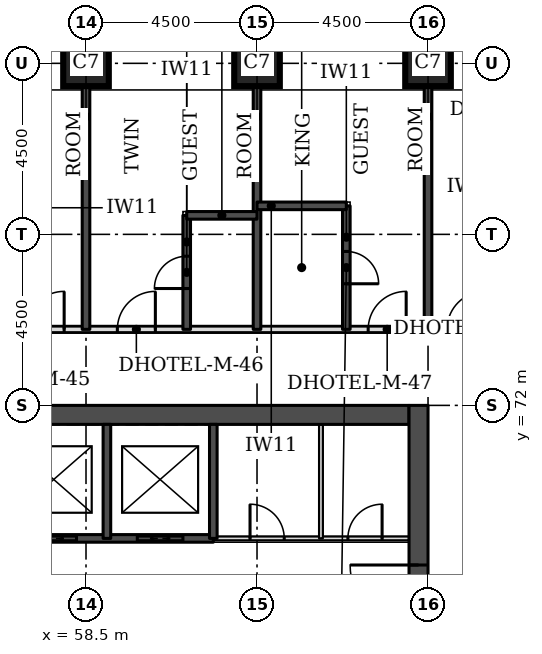
"""IFC4 building model, lengths in metres.
Left out: names, types, materials, properties, quantities, classifications, styles, units other than length and angle.
Written with IfcOpenShell. Run it as: python <this file> out.ifc"""

import sys

from ifc_helpers import new_model, si_unit, direction, frame, frame_2d, origin, origin_2d, place, context, subcontext, project, spatial, rectangle, extrude, element, fill, save


model = new_model("IFC4")
c1 = context("Model", 3, precision=1e-05, world=origin(), true_north=direction((0.0, 1.0)))
c2 = subcontext(c1, "Body", "Model", "MODEL_VIEW")
j1 = project(units=[si_unit("LENGTHUNIT", "METRE"), si_unit("PLANEANGLEUNIT", "RADIAN")], contexts=[c1])
p1 = place(None, origin())
s1 = spatial("IfcSite", under=j1, at=p1, CompositionType="ELEMENT")
p2 = place(p1, origin())
s2 = spatial("IfcBuilding", under=s1, at=p2, CompositionType="ELEMENT")
p3 = place(p2, frame((0.0, 0.0, 23.1)))
s3 = spatial("IfcBuildingStorey", under=s2, at=p3, CompositionType="ELEMENT", Elevation=23.1)
for number, where, z_axis, x_axis in (
    (1, (58.5, 81.0, 0.0), (0.0, 0.0, 1.0), (1.0, 0.0, 0.0)),
    (2, (63.0, 81.0, 0.0), (0.0, 0.0, 1.0), (1.0, 0.0, 0.0)),
    (3, (67.5, 81.0, 0.0), (0.0, 0.0, 1.0), (1.0, 0.0, 0.0)),
):
    element("IfcColumn", number, at=place(p3, frame(where, z_axis=z_axis, x_axis=x_axis)), inside=s3, PredefinedType="COLUMN", context=c2, shape_type="SweptSolid", body=[
        extrude(rectangle(XDim=1.2, YDim=1.2, at=origin_2d()), origin(), (0.0, 0.0, 1.0), 3.3),
    ])
p4 = place(p3, frame((45.5, 71.75, 0.0), z_axis=(0.0, 0.0, 1.0), x_axis=(1.0, 0.0, 0.0)))
e4 = element("IfcWall", 4, at=p4, inside=s3, PredefinedType="SHEAR", context=c2, shape_type="SweptSolid", body=[
    extrude(rectangle(XDim=21.5, YDim=0.5, at=frame_2d((10.75, 0.0))), origin(), (0.0, 0.0, 1.0), 3.3),
])
p5 = place(p3, frame((67.25, 49.5, 0.0), z_axis=(0.0, 0.0, 1.0), x_axis=(0.0, 1.0, 0.0)))
e5 = element("IfcWall", 5, at=p5, inside=s3, PredefinedType="SHEAR", context=c2, shape_type="SweptSolid", body=[
    extrude(rectangle(XDim=22.5, YDim=0.5, at=frame_2d((11.25, 0.0))), origin(), (0.0, 0.0, 1.0), 3.3),
])
p6 = place(p5, frame((4.2, 0.0, 0.0)))
e6 = element("IfcOpeningElement", 6, at=p6, cuts=e5, PredefinedType="OPENING", context=c2, shape_type="SweptSolid", body=[
    extrude(rectangle(XDim=1.8, YDim=2.1, at=frame_2d((0.9, 1.05))), frame((0.0, 0.26, 0.0), z_axis=(0.0, -1.0, 0.0), x_axis=(1.0, 0.0, 0.0)), (0.0, 0.0, 1.0), 0.52),
])
p7 = place(p5, frame((6.9, 0.0, 0.0)))
e7 = element("IfcOpeningElement", 7, at=p7, cuts=e5, PredefinedType="OPENING", context=c2, shape_type="SweptSolid", body=[
    extrude(rectangle(XDim=1.1, YDim=2.1, at=frame_2d((0.55, 1.05))), frame((0.0, 0.26, 0.0), z_axis=(0.0, -1.0, 0.0), x_axis=(1.0, 0.0, 0.0)), (0.0, 0.0, 1.0), 0.52),
])
p8 = place(p5, frame((13.6, 0.0, 0.0)))
e8 = element("IfcOpeningElement", 8, at=p8, cuts=e5, PredefinedType="OPENING", context=c2, shape_type="SweptSolid", body=[
    extrude(rectangle(XDim=1.1, YDim=2.1, at=frame_2d((0.55, 1.05))), frame((0.0, 0.26, 0.0), z_axis=(0.0, -1.0, 0.0), x_axis=(1.0, 0.0, 0.0)), (0.0, 0.0, 1.0), 0.52),
])
p9 = place(p5, frame((16.5, 0.0, 0.0)))
e9 = element("IfcOpeningElement", 9, at=p9, cuts=e5, PredefinedType="OPENING", context=c2, shape_type="SweptSolid", body=[
    extrude(rectangle(XDim=1.8, YDim=2.1, at=frame_2d((0.9, 1.05))), frame((0.0, 0.26, 0.0), z_axis=(0.0, -1.0, 0.0), x_axis=(1.0, 0.0, 0.0)), (0.0, 0.0, 1.0), 0.52),
])
p10 = place(p3, frame((43.0, 74.0, 0.0), z_axis=(0.0, 0.0, 1.0), x_axis=(1.0, 0.0, 0.0)))
e10 = element("IfcWall", 10, at=p10, inside=s3, PredefinedType="PARTITIONING", context=c2, shape_type="SweptSolid", body=[
    extrude(rectangle(XDim=26.5, YDim=0.15, at=frame_2d((13.25, 0.0))), origin(), (0.0, 0.0, 1.0), 3.08),
])
p11 = place(p10, frame((4.925, 0.0, 0.0)))
e11 = element("IfcOpeningElement", 11, at=p11, cuts=e10, PredefinedType="OPENING", context=c2, shape_type="SweptSolid", body=[
    extrude(rectangle(XDim=1.0, YDim=2.1, at=frame_2d((0.5, 1.05))), frame((0.0, 0.085, 0.0), z_axis=(0.0, -1.0, 0.0), x_axis=(1.0, 0.0, 0.0)), (0.0, 0.0, 1.0), 0.17),
])
p12 = place(p10, frame((7.325, 0.0, 0.0)))
e12 = element("IfcOpeningElement", 12, at=p12, cuts=e10, PredefinedType="OPENING", context=c2, shape_type="SweptSolid", body=[
    extrude(rectangle(XDim=1.0, YDim=2.1, at=frame_2d((0.5, 1.05))), frame((0.0, 0.085, 0.0), z_axis=(0.0, -1.0, 0.0), x_axis=(1.0, 0.0, 0.0)), (0.0, 0.0, 1.0), 0.17),
])
p13 = place(p10, frame((13.925, 0.0, 0.0)))
e13 = element("IfcOpeningElement", 13, at=p13, cuts=e10, PredefinedType="OPENING", context=c2, shape_type="SweptSolid", body=[
    extrude(rectangle(XDim=1.0, YDim=2.1, at=frame_2d((0.5, 1.05))), frame((0.0, 0.085, 0.0), z_axis=(0.0, -1.0, 0.0), x_axis=(1.0, 0.0, 0.0)), (0.0, 0.0, 1.0), 0.17),
])
p14 = place(p10, frame((16.325, 0.0, 0.0)))
e14 = element("IfcOpeningElement", 14, at=p14, cuts=e10, PredefinedType="OPENING", context=c2, shape_type="SweptSolid", body=[
    extrude(rectangle(XDim=1.0, YDim=2.1, at=frame_2d((0.5, 1.05))), frame((0.0, 0.085, 0.0), z_axis=(0.0, -1.0, 0.0), x_axis=(1.0, 0.0, 0.0)), (0.0, 0.0, 1.0), 0.17),
])
p15 = place(p10, frame((22.925, 0.0, 0.0)))
e15 = element("IfcOpeningElement", 15, at=p15, cuts=e10, PredefinedType="OPENING", context=c2, shape_type="SweptSolid", body=[
    extrude(rectangle(XDim=1.0, YDim=2.1, at=frame_2d((0.5, 1.05))), frame((0.0, 0.085, 0.0), z_axis=(0.0, -1.0, 0.0), x_axis=(1.0, 0.0, 0.0)), (0.0, 0.0, 1.0), 0.17),
])
p16 = place(p10, frame((0.5, 0.0, 0.0)))
e16 = element("IfcOpeningElement", 16, at=p16, cuts=e10, PredefinedType="OPENING", context=c2, shape_type="SweptSolid", body=[
    extrude(rectangle(XDim=1.0, YDim=2.1, at=frame_2d((0.5, 1.05))), frame((0.0, 0.085, 0.0), z_axis=(0.0, -1.0, 0.0), x_axis=(1.0, 0.0, 0.0)), (0.0, 0.0, 1.0), 0.17),
])
p17 = place(p10, frame((25.0, 0.0, 0.0)))
e17 = element("IfcOpeningElement", 17, at=p17, cuts=e10, PredefinedType="OPENING", context=c2, shape_type="SweptSolid", body=[
    extrude(rectangle(XDim=1.0, YDim=2.1, at=frame_2d((0.5, 1.05))), frame((0.0, 0.085, 0.0), z_axis=(0.0, -1.0, 0.0), x_axis=(1.0, 0.0, 0.0)), (0.0, 0.0, 1.0), 0.17),
])
p18 = place(p3, frame((58.5, 74.0, 0.0), z_axis=(0.0, 0.0, 1.0), x_axis=(0.0, 1.0, 0.0)))
e18 = element("IfcWall", 18, at=p18, inside=s3, PredefinedType="SOLIDWALL", context=c2, shape_type="SweptSolid", body=[
    extrude(rectangle(XDim=6.4, YDim=0.2, at=frame_2d((3.2, 0.0))), origin(), (0.0, 0.0, 1.0), 3.08),
])
p19 = place(p3, frame((61.15, 74.0, 0.0), z_axis=(0.0, 0.0, 1.0), x_axis=(0.0, 1.0, 0.0)))
e19 = element("IfcWall", 19, at=p19, inside=s3, PredefinedType="SOLIDWALL", context=c2, shape_type="SweptSolid", body=[
    extrude(rectangle(XDim=3.0, YDim=0.2, at=frame_2d((1.5, 0.0))), origin(), (0.0, 0.0, 1.0), 3.08),
])
p20 = place(p19, frame((1.075, 0.0, 0.0)))
e20 = element("IfcOpeningElement", 20, at=p20, cuts=e19, PredefinedType="OPENING", context=c2, shape_type="SweptSolid", body=[
    extrude(rectangle(XDim=0.85, YDim=2.1, at=frame_2d((0.425, 1.05))), frame((0.0, 0.11, 0.0), z_axis=(0.0, -1.0, 0.0), x_axis=(1.0, 0.0, 0.0)), (0.0, 0.0, 1.0), 0.22),
])
p21 = place(p3, frame((63.0, 74.0, 0.0), z_axis=(0.0, 0.0, 1.0), x_axis=(0.0, 1.0, 0.0)))
e21 = element("IfcWall", 21, at=p21, inside=s3, PredefinedType="SOLIDWALL", context=c2, shape_type="SweptSolid", body=[
    extrude(rectangle(XDim=6.4, YDim=0.2, at=frame_2d((3.2, 0.0))), origin(), (0.0, 0.0, 1.0), 3.08),
])
p22 = place(p3, frame((65.35, 74.0, 0.0), z_axis=(0.0, 0.0, 1.0), x_axis=(0.0, 1.0, 0.0)))
e22 = element("IfcWall", 22, at=p22, inside=s3, PredefinedType="SOLIDWALL", context=c2, shape_type="SweptSolid", body=[
    extrude(rectangle(XDim=3.25, YDim=0.2, at=frame_2d((1.625, 0.0))), origin(), (0.0, 0.0, 1.0), 3.08),
])
p23 = place(p22, frame((1.2, 0.0, 0.0)))
e23 = element("IfcOpeningElement", 23, at=p23, cuts=e22, PredefinedType="OPENING", context=c2, shape_type="SweptSolid", body=[
    extrude(rectangle(XDim=0.85, YDim=2.1, at=frame_2d((0.425, 1.05))), frame((0.0, 0.11, 0.0), z_axis=(0.0, -1.0, 0.0), x_axis=(1.0, 0.0, 0.0)), (0.0, 0.0, 1.0), 0.22),
])
p24 = place(p3, frame((67.5, 74.0, 0.0), z_axis=(0.0, 0.0, 1.0), x_axis=(0.0, 1.0, 0.0)))
e24 = element("IfcWall", 24, at=p24, inside=s3, PredefinedType="SOLIDWALL", context=c2, shape_type="SweptSolid", body=[
    extrude(rectangle(XDim=6.4, YDim=0.2, at=frame_2d((3.2, 0.0))), origin(), (0.0, 0.0, 1.0), 3.08),
])
p25 = place(p3, frame((61.15, 77.0, 0.0), z_axis=(0.0, 0.0, 1.0), x_axis=(1.0, 0.0, 0.0)))
e25 = element("IfcWall", 25, at=p25, inside=s3, PredefinedType="SOLIDWALL", context=c2, shape_type="SweptSolid", body=[
    extrude(rectangle(XDim=1.85, YDim=0.2, at=frame_2d((0.925, 0.0))), origin(), (0.0, 0.0, 1.0), 3.08),
])
p26 = place(p3, frame((63.0, 77.25, 0.0), z_axis=(0.0, 0.0, 1.0), x_axis=(1.0, 0.0, 0.0)))
e26 = element("IfcWall", 26, at=p26, inside=s3, PredefinedType="SOLIDWALL", context=c2, shape_type="SweptSolid", body=[
    extrude(rectangle(XDim=2.35, YDim=0.2, at=frame_2d((1.175, 0.0))), origin(), (0.0, 0.0, 1.0), 3.08),
])
p27 = place(p3, frame((61.85, 68.5, 0.0), z_axis=(0.0, 0.0, 1.0), x_axis=(1.0, 0.0, 0.0)))
e27 = element("IfcWall", 27, at=p27, inside=s3, PredefinedType="PARTITIONING", context=c2, shape_type="SweptSolid", body=[
    extrude(rectangle(XDim=5.15, YDim=0.1, at=frame_2d((2.575, 0.0))), origin(), (0.0, 0.0, 1.0), 3.08),
])
p28 = place(p27, frame((3.541, 0.0, 0.0)))
e28 = element("IfcOpeningElement", 28, at=p28, cuts=e27, PredefinedType="OPENING", context=c2, shape_type="SweptSolid", body=[
    extrude(rectangle(XDim=0.9, YDim=2.1, at=frame_2d((0.45, 1.05))), frame((0.0, 0.06, 0.0), z_axis=(0.0, -1.0, 0.0), x_axis=(1.0, 0.0, 0.0)), (0.0, 0.0, 1.0), 0.12),
])
p29 = place(p27, frame((0.966, 0.0, 0.0)))
e29 = element("IfcOpeningElement", 29, at=p29, cuts=e27, PredefinedType="OPENING", context=c2, shape_type="SweptSolid", body=[
    extrude(rectangle(XDim=0.9, YDim=2.1, at=frame_2d((0.45, 1.05))), frame((0.0, 0.06, 0.0), z_axis=(0.0, -1.0, 0.0), x_axis=(1.0, 0.0, 0.0)), (0.0, 0.0, 1.0), 0.12),
])
p30 = place(p3, frame((50.65, 68.5, 0.0), z_axis=(0.0, 0.0, 1.0), x_axis=(1.0, 0.0, 0.0)))
e30 = element("IfcWall", 30, at=p30, inside=s3, PredefinedType="SOLIDWALL", context=c2, shape_type="SweptSolid", body=[
    extrude(rectangle(XDim=11.2, YDim=0.2, at=frame_2d((5.6, 0.0))), origin(), (0.0, 0.0, 1.0), 3.08),
])
p31 = place(p30, frame((0.8, 0.0, 0.0)))
e31 = element("IfcOpeningElement", 31, at=p31, cuts=e30, PredefinedType="OPENING", context=c2, shape_type="SweptSolid", body=[
    extrude(rectangle(XDim=1.2, YDim=2.1, at=frame_2d((0.6, 1.05))), frame((0.0, 0.11, 0.0), z_axis=(0.0, -1.0, 0.0), x_axis=(1.0, 0.0, 0.0)), (0.0, 0.0, 1.0), 0.22),
])
p32 = place(p30, frame((3.6, 0.0, 0.0)))
e32 = element("IfcOpeningElement", 32, at=p32, cuts=e30, PredefinedType="OPENING", context=c2, shape_type="SweptSolid", body=[
    extrude(rectangle(XDim=1.2, YDim=2.1, at=frame_2d((0.6, 1.05))), frame((0.0, 0.11, 0.0), z_axis=(0.0, -1.0, 0.0), x_axis=(1.0, 0.0, 0.0)), (0.0, 0.0, 1.0), 0.22),
])
p33 = place(p30, frame((6.4, 0.0, 0.0)))
e33 = element("IfcOpeningElement", 33, at=p33, cuts=e30, PredefinedType="OPENING", context=c2, shape_type="SweptSolid", body=[
    extrude(rectangle(XDim=1.2, YDim=2.1, at=frame_2d((0.6, 1.05))), frame((0.0, 0.11, 0.0), z_axis=(0.0, -1.0, 0.0), x_axis=(1.0, 0.0, 0.0)), (0.0, 0.0, 1.0), 0.22),
])
p34 = place(p30, frame((9.2, 0.0, 0.0)))
e34 = element("IfcOpeningElement", 34, at=p34, cuts=e30, PredefinedType="OPENING", context=c2, shape_type="SweptSolid", body=[
    extrude(rectangle(XDim=1.2, YDim=2.1, at=frame_2d((0.6, 1.05))), frame((0.0, 0.11, 0.0), z_axis=(0.0, -1.0, 0.0), x_axis=(1.0, 0.0, 0.0)), (0.0, 0.0, 1.0), 0.22),
])
for number, where, z_axis, x_axis in (
    (35, (59.05, 68.5, 0.0), (0.0, 0.0, 1.0), (0.0, 1.0, 0.0)),
    (36, (61.85, 68.5, 0.0), (0.0, 0.0, 1.0), (0.0, 1.0, 0.0)),
):
    element("IfcWall", number, at=place(p3, frame(where, z_axis=z_axis, x_axis=x_axis)), inside=s3, PredefinedType="SOLIDWALL", context=c2, shape_type="SweptSolid", body=[
        extrude(rectangle(XDim=3.0, YDim=0.2, at=frame_2d((1.5, 0.0))), origin(), (0.0, 0.0, 1.0), 3.08),
    ])
p35 = place(p3, frame((64.683, 68.5, 0.0), z_axis=(0.0, 0.0, 1.0), x_axis=(0.0, 1.0, 0.0)))
e37 = element("IfcWall", 37, at=p35, inside=s3, PredefinedType="PARTITIONING", context=c2, shape_type="SweptSolid", body=[
    extrude(rectangle(XDim=3.0, YDim=0.1, at=frame_2d((1.5, 0.0))), origin(), (0.0, 0.0, 1.0), 3.08),
])
p36 = place(p13, origin())
e38 = element("IfcDoor", 38, at=p36, inside=s3, OperationType="SINGLE_SWING_RIGHT", PredefinedType="DOOR", context=c2, shape_type="SweptSolid", body=[
    extrude(rectangle(XDim=1.0, YDim=2.1, at=frame_2d((0.5, 1.05))), frame((0.0, 0.025, 0.0), z_axis=(0.0, -1.0, 0.0), x_axis=(1.0, 0.0, 0.0)), (0.0, 0.0, 1.0), 0.05),
])
fill(e13, e38)
p37 = place(p14, origin())
e39 = element("IfcDoor", 39, at=p37, inside=s3, OperationType="SINGLE_SWING_RIGHT", PredefinedType="DOOR", context=c2, shape_type="SweptSolid", body=[
    extrude(rectangle(XDim=1.0, YDim=2.1, at=frame_2d((0.5, 1.05))), frame((0.0, 0.025, 0.0), z_axis=(0.0, -1.0, 0.0), x_axis=(1.0, 0.0, 0.0)), (0.0, 0.0, 1.0), 0.05),
])
fill(e14, e39)
p38 = place(p20, origin())
e40 = element("IfcDoor", 40, at=p38, inside=s3, OperationType="SINGLE_SWING_LEFT", PredefinedType="DOOR", context=c2, shape_type="SweptSolid", body=[
    extrude(rectangle(XDim=0.85, YDim=2.1, at=frame_2d((0.425, 1.05))), frame((0.0, 0.025, 0.0), z_axis=(0.0, -1.0, 0.0), x_axis=(1.0, 0.0, 0.0)), (0.0, 0.0, 1.0), 0.05),
])
fill(e20, e40)
p39 = place(p15, origin())
e41 = element("IfcDoor", 41, at=p39, inside=s3, OperationType="SINGLE_SWING_RIGHT", PredefinedType="DOOR", context=c2, shape_type="SweptSolid", body=[
    extrude(rectangle(XDim=1.0, YDim=2.1, at=frame_2d((0.5, 1.05))), frame((0.0, 0.025, 0.0), z_axis=(0.0, -1.0, 0.0), x_axis=(1.0, 0.0, 0.0)), (0.0, 0.0, 1.0), 0.05),
])
fill(e15, e41)
p40 = place(p23, frame((0.85, 0.0, 0.0), z_axis=(0.0, 0.0, 1.0), x_axis=(-1.0, 0.0, 0.0)))
e42 = element("IfcDoor", 42, at=p40, inside=s3, OperationType="SINGLE_SWING_RIGHT", PredefinedType="DOOR", context=c2, shape_type="SweptSolid", body=[
    extrude(rectangle(XDim=0.85, YDim=2.1, at=frame_2d((0.425, 1.05))), frame((0.0, 0.025, 0.0), z_axis=(0.0, -1.0, 0.0), x_axis=(1.0, 0.0, 0.0)), (0.0, 0.0, 1.0), 0.05),
])
fill(e23, e42)
p41 = place(p17, origin())
e43 = element("IfcDoor", 43, at=p41, inside=s3, OperationType="SINGLE_SWING_RIGHT", PredefinedType="DOOR", context=c2, shape_type="SweptSolid", body=[
    extrude(rectangle(XDim=1.0, YDim=2.1, at=frame_2d((0.5, 1.05))), frame((0.0, 0.025, 0.0), z_axis=(0.0, -1.0, 0.0), x_axis=(1.0, 0.0, 0.0)), (0.0, 0.0, 1.0), 0.05),
])
fill(e17, e43)
p42 = place(p33, origin())
e44 = element("IfcDoor", 44, at=p42, inside=s3, OperationType="DOUBLE_DOOR_SLIDING", PredefinedType="DOOR", context=c2, shape_type="SweptSolid", body=[
    extrude(rectangle(XDim=1.2, YDim=2.1, at=frame_2d((0.6, 1.05))), frame((0.0, 0.025, 0.0), z_axis=(0.0, -1.0, 0.0), x_axis=(1.0, 0.0, 0.0)), (0.0, 0.0, 1.0), 0.05),
])
fill(e33, e44)
p43 = place(p34, origin())
e45 = element("IfcDoor", 45, at=p43, inside=s3, OperationType="DOUBLE_DOOR_SLIDING", PredefinedType="DOOR", context=c2, shape_type="SweptSolid", body=[
    extrude(rectangle(XDim=1.2, YDim=2.1, at=frame_2d((0.6, 1.05))), frame((0.0, 0.025, 0.0), z_axis=(0.0, -1.0, 0.0), x_axis=(1.0, 0.0, 0.0)), (0.0, 0.0, 1.0), 0.05),
])
fill(e34, e45)
p44 = place(p9, origin())
e46 = element("IfcDoor", 46, at=p44, inside=s3, OperationType="SINGLE_SWING_RIGHT", PredefinedType="DOOR", context=c2, shape_type="SweptSolid", body=[
    extrude(rectangle(XDim=1.8, YDim=2.1, at=frame_2d((0.9, 1.05))), frame((0.0, 0.025, 0.0), z_axis=(0.0, -1.0, 0.0), x_axis=(1.0, 0.0, 0.0)), (0.0, 0.0, 1.0), 0.05),
])
fill(e9, e46)
p45 = place(p28, origin())
e47 = element("IfcDoor", 47, at=p45, inside=s3, OperationType="SINGLE_SWING_RIGHT", PredefinedType="DOOR", context=c2, shape_type="SweptSolid", body=[
    extrude(rectangle(XDim=0.9, YDim=2.1, at=frame_2d((0.45, 1.05))), frame((0.0, 0.025, 0.0), z_axis=(0.0, -1.0, 0.0), x_axis=(1.0, 0.0, 0.0)), (0.0, 0.0, 1.0), 0.05),
])
fill(e28, e47)
p46 = place(p29, origin())
e48 = element("IfcDoor", 48, at=p46, inside=s3, OperationType="SINGLE_SWING_LEFT", PredefinedType="DOOR", context=c2, shape_type="SweptSolid", body=[
    extrude(rectangle(XDim=0.9, YDim=2.1, at=frame_2d((0.45, 1.05))), frame((0.0, 0.025, 0.0), z_axis=(0.0, -1.0, 0.0), x_axis=(1.0, 0.0, 0.0)), (0.0, 0.0, 1.0), 0.05),
])
fill(e29, e48)
save(model, sys.argv[1])
